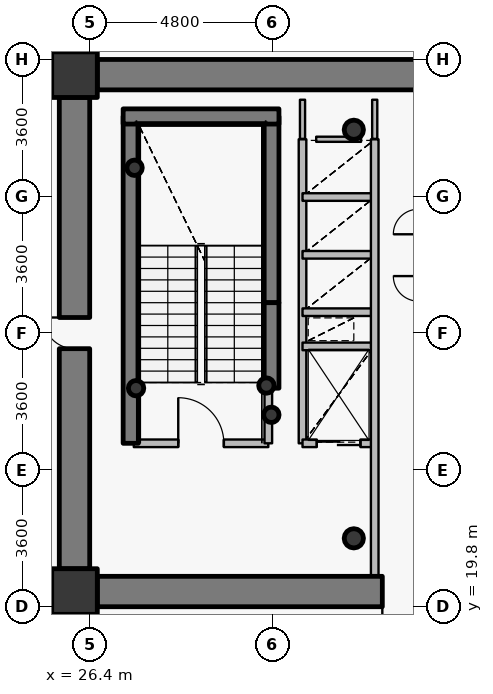
"""IFC4 building model, lengths in metres.
Left out: names, types, materials, properties, quantities, classifications, styles, units other than length and angle.
Written with IfcOpenShell. Run it as: python <this file> out.ifc"""

import sys

from ifc_helpers import new_model, si_unit, direction, frame, frame_2d, origin, origin_2d, place, context, subcontext, project, spatial, rectangle, hollow_circle, extrude, source, transform, mapped, element, fill, save


model = new_model("IFC4")
c1 = context("Model", 3, precision=1e-05, world=origin(), true_north=direction((0.0, 1.0)))
c2 = subcontext(c1, "Body", "Model", "MODEL_VIEW")
j1 = project(units=[si_unit("LENGTHUNIT", "METRE"), si_unit("PLANEANGLEUNIT", "RADIAN")], contexts=[c1])
p1 = place(None, origin())
s1 = spatial("IfcSite", under=j1, at=p1, CompositionType="ELEMENT")
p2 = place(p1, origin())
s2 = spatial("IfcBuilding", under=s1, at=p2, CompositionType="ELEMENT")
p3 = place(p2, frame((0.0, 0.0, 138.45)))
s3 = spatial("IfcBuildingStorey", under=s2, at=p3, CompositionType="ELEMENT", Elevation=138.45)
for number, where, z_axis, x_axis in (
    (1, (26.0, 20.2, 0.0), (0.0, 0.0, 1.0), (1.0, 0.0, 0.0)),
    (2, (26.0, 33.8, 0.0), (0.0, 0.0, 1.0), (1.0, 0.0, 0.0)),
):
    element("IfcColumn", number, at=place(p3, frame(where, z_axis=z_axis, x_axis=x_axis)), inside=s3, PredefinedType="COLUMN", context=c2, shape_type="SweptSolid", body=[
        extrude(rectangle(XDim=1.2, YDim=1.2, at=origin_2d()), origin(), (0.0, 0.0, 1.0), 3.75),
    ])
for number, where, z_axis, x_axis in (
    (3, (33.35, 21.6, 0.0), (0.0, 0.0, 1.0), (1.0, 0.0, 0.0)),
    (4, (33.35, 32.35, 0.0), (0.0, 0.0, 1.0), (1.0, 0.0, 0.0)),
):
    element("IfcColumn", number, at=place(p3, frame(where, z_axis=z_axis, x_axis=x_axis)), inside=s3, PredefinedType="COLUMN", context=c2, shape_type="SweptSolid", body=[
        extrude(hollow_circle(Radius=0.254, WallThickness=0.02, at=origin_2d()), origin(), (0.0, 0.0, 1.0), 3.75),
    ])
p4 = place(p3, frame((27.48, 24.1, 0.0), z_axis=(0.0, 0.0, 1.0), x_axis=(0.0, 1.0, 0.0)))
e5 = element("IfcWall", 5, at=p4, inside=s3, PredefinedType="SHEAR", context=c2, shape_type="SweptSolid", body=[
    extrude(rectangle(XDim=8.6, YDim=0.4, at=frame_2d((4.3, 0.0))), origin(), (0.0, 0.0, 1.0), 3.75),
])
p5 = place(p3, frame((31.18, 27.8, 0.0), z_axis=(0.0, 0.0, 1.0), x_axis=(0.0, 1.0, 0.0)))
e6 = element("IfcWall", 6, at=p5, inside=s3, PredefinedType="SHEAR", context=c2, shape_type="SweptSolid", body=[
    extrude(rectangle(XDim=4.9, YDim=0.4, at=frame_2d((2.45, 0.0))), origin(), (0.0, 0.0, 1.0), 3.75),
])
p6 = place(p3, frame((27.28, 32.7, 0.0), z_axis=(0.0, 0.0, 1.0), x_axis=(1.0, 0.0, 0.0)))
e7 = element("IfcWall", 7, at=p6, inside=s3, PredefinedType="SHEAR", context=c2, shape_type="SweptSolid", body=[
    extrude(rectangle(XDim=4.1, YDim=0.4, at=frame_2d((2.05, 0.0))), origin(), (0.0, 0.0, 1.0), 3.75),
])
for number, where, z_axis, x_axis in (
    (8, (27.58, 31.35, 0.0), (0.0, 0.0, 1.0), (1.0, 0.0, 0.0)),
    (9, (31.05, 25.62, 0.0), (0.0, 0.0, 1.0), (1.0, 0.0, 0.0)),
    (10, (31.18, 24.85, 0.0), (0.0, 0.0, 1.0), (1.0, 0.0, 0.0)),
    (11, (27.62, 25.55, 0.0), (0.0, 0.0, 1.0), (1.0, 0.0, 0.0)),
):
    element("IfcColumn", number, at=place(p3, frame(where, z_axis=z_axis, x_axis=x_axis)), inside=s3, PredefinedType="COLUMN", context=c2, shape_type="SweptSolid", body=[
        extrude(hollow_circle(Radius=0.203, WallThickness=0.016, at=origin_2d()), origin(), (0.0, 0.0, 1.0), 3.75),
    ])
p7 = place(p3, frame((26.6, 33.8, 0.0), z_axis=(0.0, 0.0, 1.0), x_axis=(1.0, 0.0, 0.0)))
e12 = element("IfcWall", 12, at=p7, inside=s3, PredefinedType="SHEAR", context=c2, shape_type="SweptSolid", body=[
    extrude(rectangle(XDim=18.8, YDim=0.8, at=frame_2d((9.4, 0.0))), origin(), (0.0, 0.0, 1.0), 2.95),
])
p8 = place(p3, frame((45.4, 20.2, 0.0), z_axis=(0.0, 0.0, 1.0), x_axis=(-1.0, 0.0, 0.0)))
e13 = element("IfcWall", 13, at=p8, inside=s3, PredefinedType="SHEAR", context=c2, shape_type="SweptSolid", body=[
    extrude(rectangle(XDim=18.8, YDim=0.8, at=frame_2d((9.4, 0.0))), origin(), (0.0, 0.0, 1.0), 2.95),
])
p9 = place(p8, frame((10.15, 0.0, 0.0)))
e14 = element("IfcOpeningElement", 14, at=p9, cuts=e13, PredefinedType="OPENING", context=c2, shape_type="SweptSolid", body=[
    extrude(rectangle(XDim=1.15, YDim=2.15, at=origin_2d()), frame((0.575, 0.41, 1.075), z_axis=(0.0, -1.0, 0.0), x_axis=(1.0, 0.0, 0.0)), (0.0, 0.0, 1.0), 0.82),
])
p10 = place(p3, frame((26.0, 20.8, 0.0), z_axis=(0.0, 0.0, 1.0), x_axis=(0.0, 1.0, 0.0)))
e15 = element("IfcWall", 15, at=p10, inside=s3, PredefinedType="SHEAR", context=c2, shape_type="SweptSolid", body=[
    extrude(rectangle(XDim=12.4, YDim=0.8, at=frame_2d((6.2, 0.0))), origin(), (0.0, 0.0, 1.0), 2.95),
])
p11 = place(p10, frame((5.79, 0.0, 0.0)))
e16 = element("IfcOpeningElement", 16, at=p11, cuts=e15, PredefinedType="OPENING", context=c2, shape_type="SweptSolid", body=[
    extrude(rectangle(XDim=0.82, YDim=2.1, at=origin_2d()), frame((0.41, 0.41, 1.05), z_axis=(0.0, -1.0, 0.0), x_axis=(1.0, 0.0, 0.0)), (0.0, 0.0, 1.0), 0.82),
])
p12 = place(p3, frame((31.18, 25.55, 0.0), z_axis=(0.0, 0.0, 1.0), x_axis=(0.0, 1.0, 0.0)))
e17 = element("IfcWall", 17, at=p12, inside=s3, PredefinedType="SHEAR", context=c2, shape_type="SweptSolid", body=[
    extrude(rectangle(XDim=2.25, YDim=0.4, at=frame_2d((1.125, 0.0))), origin(), (0.0, 0.0, 1.0), 3.1),
])
p13 = place(p3, frame((27.56, 24.1, 0.0), z_axis=(0.0, 0.0, 1.0), x_axis=(1.0, 0.0, 0.0)))
e18 = element("IfcWall", 18, at=p13, inside=s3, PredefinedType="PARTITIONING", context=c2, shape_type="SweptSolid", body=[
    extrude(rectangle(XDim=3.54, YDim=0.2, at=frame_2d((1.77, 0.0))), origin(), (0.0, 0.0, 1.0), 3.5),
])
p14 = place(p13, frame((1.17, 0.0, 0.0)))
e19 = element("IfcOpeningElement", 19, at=p14, cuts=e18, PredefinedType="OPENING", context=c2, shape_type="SweptSolid", body=[
    extrude(rectangle(XDim=1.2, YDim=2.15, at=origin_2d()), frame((0.6, 0.11, 1.075), z_axis=(0.0, -1.0, 0.0), x_axis=(1.0, 0.0, 0.0)), (0.0, 0.0, 1.0), 0.22),
])
p15 = place(p3, frame((31.1, 24.1, 0.0), z_axis=(0.0, 0.0, 1.0), x_axis=(0.0, 1.0, 0.0)))
e20 = element("IfcWall", 20, at=p15, inside=s3, PredefinedType="PARTITIONING", context=c2, shape_type="SweptSolid", body=[
    extrude(rectangle(XDim=1.44, YDim=0.2, at=frame_2d((0.72, 0.0))), origin(), (0.0, 0.0, 1.0), 3.5),
])
p16 = place(p3, frame((32.0, 24.1, 0.0), z_axis=(0.0, 0.0, 1.0), x_axis=(0.0, 1.0, 0.0)))
e21 = element("IfcWall", 21, at=p16, inside=s3, PredefinedType="PARTITIONING", context=c2, shape_type="SweptSolid", body=[
    extrude(rectangle(XDim=8.0, YDim=0.2, at=frame_2d((4.0, 0.0))), origin(), (0.0, 0.0, 1.0), 3.5),
])
p17 = place(p3, frame((32.0, 24.1, 0.0), z_axis=(0.0, 0.0, 1.0), x_axis=(1.0, 0.0, 0.0)))
e22 = element("IfcWall", 22, at=p17, inside=s3, PredefinedType="PARTITIONING", context=c2, shape_type="SweptSolid", body=[
    extrude(rectangle(XDim=1.9, YDim=0.2, at=frame_2d((0.95, 0.0))), origin(), (0.0, 0.0, 1.0), 3.085),
])
p18 = place(p17, frame((0.375, 0.0, 0.0)))
e23 = element("IfcOpeningElement", 23, at=p18, cuts=e22, PredefinedType="OPENING", context=c2, shape_type="SweptSolid", body=[
    extrude(rectangle(XDim=1.15, YDim=2.15, at=origin_2d()), frame((0.575, 0.11, 1.075), z_axis=(0.0, -1.0, 0.0), x_axis=(1.0, 0.0, 0.0)), (0.0, 0.0, 1.0), 0.22),
])
for number, where, z_axis, x_axis in (
    (24, (32.0, 26.65, 0.0), (0.0, 0.0, 1.0), (1.0, 0.0, 0.0)),
    (25, (32.0, 27.55, 0.0), (0.0, 0.0, 1.0), (1.0, 0.0, 0.0)),
    (26, (32.0, 29.06, 0.0), (0.0, 0.0, 1.0), (1.0, 0.0, 0.0)),
    (27, (32.0, 30.58, 0.0), (0.0, 0.0, 1.0), (1.0, 0.0, 0.0)),
):
    element("IfcWall", number, at=place(p3, frame(where, z_axis=z_axis, x_axis=x_axis)), inside=s3, PredefinedType="PARTITIONING", context=c2, shape_type="SweptSolid", body=[
        extrude(rectangle(XDim=1.9, YDim=0.2, at=frame_2d((0.95, 0.0))), origin(), (0.0, 0.0, 1.0), 3.085),
    ])
p19 = place(p3, frame((33.9, 20.6, 0.0), z_axis=(0.0, 0.0, 1.0), x_axis=(0.0, 1.0, 0.0)))
e28 = element("IfcWall", 28, at=p19, inside=s3, PredefinedType="PARTITIONING", context=c2, shape_type="SweptSolid", body=[
    extrude(rectangle(XDim=11.5, YDim=0.2, at=frame_2d((5.75, 0.0))), origin(), (0.0, 0.0, 1.0), 3.085),
])
p20 = place(p3, frame((32.36, 32.1, 0.0), z_axis=(0.0, 0.0, 1.0), x_axis=(1.0, 0.0, 0.0)))
e29 = element("IfcWall", 29, at=p20, inside=s3, PredefinedType="PARTITIONING", context=c2, shape_type="SweptSolid", body=[
    extrude(rectangle(XDim=1.18, YDim=0.135, at=frame_2d((0.59, 0.0))), origin(), (0.0, 0.0, 1.0), 3.085),
])
p21 = place(p3, frame((32.0, 33.14, 0.0), z_axis=(0.0, 0.0, 1.0), x_axis=(0.0, -1.0, 0.0)))
e30 = element("IfcWall", 30, at=p21, inside=s3, PredefinedType="PARTITIONING", context=c2, shape_type="SweptSolid", body=[
    extrude(rectangle(XDim=1.03, YDim=0.135, at=frame_2d((0.515, 0.0))), origin(), (0.0, 0.0, 1.0), 3.035),
])
p22 = place(p3, frame((33.9, 32.11, 0.0), z_axis=(0.0, 0.0, 1.0), x_axis=(0.0, 1.0, 0.0)))
e31 = element("IfcWall", 31, at=p22, inside=s3, PredefinedType="PARTITIONING", context=c2, shape_type="SweptSolid", body=[
    extrude(rectangle(XDim=1.03, YDim=0.135, at=frame_2d((0.515, 0.0))), origin(), (0.0, 0.0, 1.0), 3.085),
])
p23 = place(p3, frame((26.59, 34.2, 0.0), z_axis=(0.0, 0.0, 1.0), x_axis=(-1.0, 0.0, 0.0)))
e32 = element("IfcWall", 32, at=p23, inside=s3, PredefinedType="PARTITIONING", context=c2, shape_type="SweptSolid", body=[
    extrude(rectangle(XDim=0.99, YDim=0.135, at=frame_2d((0.495, 0.0))), origin(), (0.0, 0.0, 1.0), 2.935),
])
p24 = place(p3, frame((25.6, 33.893, 0.0), z_axis=(0.0, 0.0, 1.0), x_axis=(0.0, -1.0, 0.0)))
e33 = element("IfcWall", 33, at=p24, inside=s3, PredefinedType="PARTITIONING", context=c2, shape_type="SweptSolid", body=[
    extrude(rectangle(XDim=0.683, YDim=0.135, at=frame_2d((0.341, 0.0))), origin(), (0.0, 0.0, 1.0), 3.5),
])
p25 = place(p3, frame((25.6, 20.79, 0.0), z_axis=(0.0, 0.0, 1.0), x_axis=(0.0, -1.0, 0.0)))
e34 = element("IfcWall", 34, at=p25, inside=s3, PredefinedType="PARTITIONING", context=c2, shape_type="SweptSolid", body=[
    extrude(rectangle(XDim=0.99, YDim=0.135, at=frame_2d((0.495, 0.0))), origin(), (0.0, 0.0, 1.0), 3.5),
])
p26 = place(p3, frame((25.907, 19.8, 0.0), z_axis=(0.0, 0.0, 1.0), x_axis=(1.0, 0.0, 0.0)))
e35 = element("IfcWall", 35, at=p26, inside=s3, PredefinedType="PARTITIONING", context=c2, shape_type="SweptSolid", body=[
    extrude(rectangle(XDim=0.683, YDim=0.135, at=frame_2d((0.341, 0.0))), origin(), (0.0, 0.0, 1.0), 2.935),
])
m1 = source(origin(), c2, "Body", "SweptSolid", [
    extrude(rectangle(XDim=0.82, YDim=2.1, at=origin_2d()), frame((0.41, 0.025, 1.05), z_axis=(0.0, -1.0, 0.0), x_axis=(1.0, 0.0, 0.0)), (0.0, 0.0, 1.0), 0.05),
])
p27 = place(p11, origin())
e36 = element("IfcDoor", 36, at=p27, inside=s3, OperationType="SINGLE_SWING_RIGHT", PredefinedType="DOOR", context=c2, shape_type="MappedRepresentation", body=[
    mapped(m1, transform((0.0, 0.0, 0.0), x_axis=(1.0, 0.0, 0.0), y_axis=(0.0, 1.0, 0.0), z_axis=(0.0, 0.0, 1.0), scale=1.0)),
])
fill(e16, e36)
m2 = source(origin(), c2, "Body", "SweptSolid", [
    extrude(rectangle(XDim=1.15, YDim=2.15, at=origin_2d()), frame((0.575, 0.025, 1.075), z_axis=(0.0, -1.0, 0.0), x_axis=(1.0, 0.0, 0.0)), (0.0, 0.0, 1.0), 0.05),
])
p28 = place(p9, origin())
e37 = element("IfcDoor", 37, at=p28, inside=s3, OperationType="SINGLE_SWING_RIGHT", PredefinedType="DOOR", context=c2, shape_type="MappedRepresentation", body=[
    mapped(m2, transform((0.0, 0.0, 0.0), x_axis=(1.0, 0.0, 0.0), y_axis=(0.0, 1.0, 0.0), z_axis=(0.0, 0.0, 1.0), scale=1.0)),
])
fill(e14, e37)
m3 = source(origin(), c2, "Body", "SweptSolid", [
    extrude(rectangle(XDim=1.2, YDim=2.15, at=origin_2d()), frame((0.6, 0.025, 1.075), z_axis=(0.0, -1.0, 0.0), x_axis=(1.0, 0.0, 0.0)), (0.0, 0.0, 1.0), 0.05),
])
p29 = place(p14, origin())
e38 = element("IfcDoor", 38, at=p29, inside=s3, OperationType="SINGLE_SWING_LEFT", PredefinedType="DOOR", context=c2, shape_type="MappedRepresentation", body=[
    mapped(m3, transform((0.0, 0.0, 0.0), x_axis=(1.0, 0.0, 0.0), y_axis=(0.0, 1.0, 0.0), z_axis=(0.0, 0.0, 1.0), scale=1.0)),
])
fill(e19, e38)
m4 = source(origin(), c2, "Body", "SweptSolid", [
    extrude(rectangle(XDim=1.15, YDim=2.15, at=origin_2d()), frame((0.575, 0.025, 1.075), z_axis=(0.0, -1.0, 0.0), x_axis=(1.0, 0.0, 0.0)), (0.0, 0.0, 1.0), 0.05),
])
p30 = place(p18, origin())
e39 = element("IfcDoor", 39, at=p30, inside=s3, OperationType="DOUBLE_DOOR_SLIDING", PredefinedType="USERDEFINED", context=c2, shape_type="MappedRepresentation", body=[
    mapped(m4, transform((0.0, 0.0, 0.0), x_axis=(1.0, 0.0, 0.0), y_axis=(0.0, 1.0, 0.0), z_axis=(0.0, 0.0, 1.0), scale=1.0)),
])
fill(e23, e39)
save(model, sys.argv[1])
